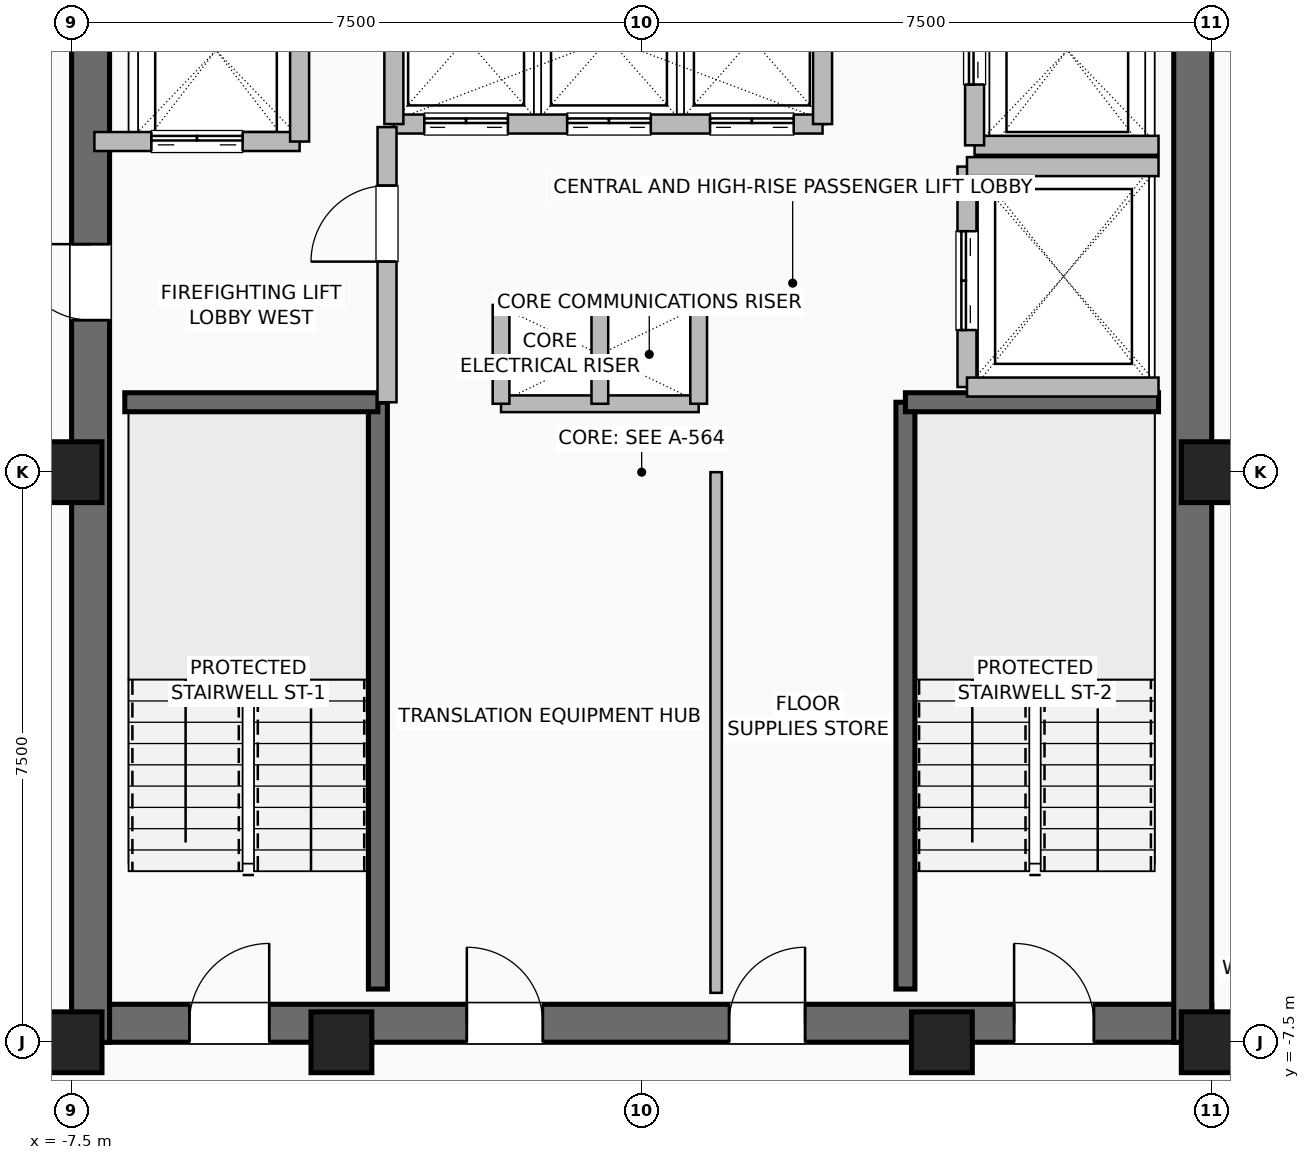
"""IFC4 building model, lengths in metres.
Left out: names, types, materials, properties, quantities, classifications, styles, units other than length and angle.
Written with IfcOpenShell. Run it as: python <this file> out.ifc"""

import sys

from ifc_helpers import new_model, si_unit, direction, frame, frame_2d, origin, origin_2d, place, context, subcontext, project, spatial, rectangle, hollow_rectangle, extrude, element, fill, save


model = new_model("IFC4")
c1 = context("Model", 3, precision=1e-05, world=origin(), true_north=direction((0.0, 1.0)))
c2 = subcontext(c1, "Body", "Model", "MODEL_VIEW")
j1 = project(units=[si_unit("LENGTHUNIT", "METRE"), si_unit("PLANEANGLEUNIT", "RADIAN")], contexts=[c1])
p1 = place(None, origin())
s1 = spatial("IfcSite", under=j1, at=p1, CompositionType="ELEMENT")
p2 = place(p1, origin())
s2 = spatial("IfcBuilding", under=s1, at=p2, CompositionType="ELEMENT")
p3 = place(p2, frame((0.0, 0.0, 257.6)))
s3 = spatial("IfcBuildingStorey", under=s2, at=p3, CompositionType="ELEMENT", Elevation=257.6)
for number, where, z_axis, x_axis in (
    (1, (-7.5, -7.5, 0.0), (0.0, 0.0, 1.0), (1.0, 0.0, 0.0)),
    (2, (-3.95, -7.5, 0.0), (0.0, 0.0, 1.0), (1.0, 0.0, 0.0)),
    (3, (3.95, -7.5, 0.0), (0.0, 0.0, 1.0), (1.0, 0.0, 0.0)),
    (4, (7.5, -7.5, 0.0), (0.0, 0.0, 1.0), (1.0, 0.0, 0.0)),
    (5, (7.5, 0.0, 0.0), (0.0, 0.0, 1.0), (1.0, 0.0, 0.0)),
    (6, (-7.5, 0.0, 0.0), (0.0, 0.0, 1.0), (1.0, 0.0, 0.0)),
):
    element("IfcColumn", number, at=place(p3, frame(where, z_axis=z_axis, x_axis=x_axis)), inside=s3, PredefinedType="COLUMN", context=c2, shape_type="SweptSolid", body=[
        extrude(hollow_rectangle(XDim=0.8, YDim=0.8, WallThickness=0.04, at=origin_2d()), origin(), (0.0, 0.0, 1.0), 3.6),
    ])
p4 = place(p3, frame((-7.5, -7.25, 0.0), z_axis=(0.0, 0.0, 1.0), x_axis=(1.0, 0.0, 0.0)))
e7 = element("IfcWall", 7, at=p4, inside=s3, PredefinedType="SHEAR", context=c2, shape_type="SweptSolid", body=[
    extrude(rectangle(XDim=15.0, YDim=0.5, at=frame_2d((7.5, 0.0))), origin(), (0.0, 0.0, 1.0), 3.36),
])
p5 = place(p4, frame((1.55, 0.0, 0.0)))
e8 = element("IfcOpeningElement", 8, at=p5, cuts=e7, PredefinedType="OPENING", context=c2, shape_type="SweptSolid", body=[
    extrude(rectangle(XDim=1.05, YDim=2.08, at=frame_2d((0.525, 1.04))), frame((0.0, 0.26, 0.0), z_axis=(0.0, -1.0, 0.0), x_axis=(1.0, 0.0, 0.0)), (0.0, 0.0, 1.0), 0.52),
])
p6 = place(p4, frame((12.4, 0.0, 0.0)))
e9 = element("IfcOpeningElement", 9, at=p6, cuts=e7, PredefinedType="OPENING", context=c2, shape_type="SweptSolid", body=[
    extrude(rectangle(XDim=1.05, YDim=2.08, at=frame_2d((0.525, 1.04))), frame((0.0, 0.26, 0.0), z_axis=(0.0, -1.0, 0.0), x_axis=(1.0, 0.0, 0.0)), (0.0, 0.0, 1.0), 0.52),
])
p7 = place(p4, frame((5.2, 0.0, 0.0)))
e10 = element("IfcOpeningElement", 10, at=p7, cuts=e7, PredefinedType="OPENING", context=c2, shape_type="SweptSolid", body=[
    extrude(rectangle(XDim=1.0, YDim=2.08, at=frame_2d((0.5, 1.04))), frame((0.0, 0.26, 0.0), z_axis=(0.0, -1.0, 0.0), x_axis=(1.0, 0.0, 0.0)), (0.0, 0.0, 1.0), 0.52),
])
p8 = place(p4, frame((8.65, 0.0, 0.0)))
e11 = element("IfcOpeningElement", 11, at=p8, cuts=e7, PredefinedType="OPENING", context=c2, shape_type="SweptSolid", body=[
    extrude(rectangle(XDim=1.0, YDim=2.08, at=frame_2d((0.5, 1.04))), frame((0.0, 0.26, 0.0), z_axis=(0.0, -1.0, 0.0), x_axis=(1.0, 0.0, 0.0)), (0.0, 0.0, 1.0), 0.52),
])
p9 = place(p3, frame((-7.25, -7.5, 0.0), z_axis=(0.0, 0.0, 1.0), x_axis=(0.0, 1.0, 0.0)))
e12 = element("IfcWall", 12, at=p9, inside=s3, PredefinedType="SHEAR", context=c2, shape_type="SweptSolid", body=[
    extrude(rectangle(XDim=15.0, YDim=0.5, at=frame_2d((7.5, 0.0))), origin(), (0.0, 0.0, 1.0), 3.36),
])
p10 = place(p9, frame((9.5, 0.0, 0.0)))
e13 = element("IfcOpeningElement", 13, at=p10, cuts=e12, PredefinedType="OPENING", context=c2, shape_type="SweptSolid", body=[
    extrude(rectangle(XDim=1.0, YDim=2.08, at=frame_2d((0.5, 1.04))), frame((0.0, 0.26, 0.0), z_axis=(0.0, -1.0, 0.0), x_axis=(1.0, 0.0, 0.0)), (0.0, 0.0, 1.0), 0.52),
])
p11 = place(p3, frame((7.25, -7.5, 0.0), z_axis=(0.0, 0.0, 1.0), x_axis=(0.0, 1.0, 0.0)))
e14 = element("IfcWall", 14, at=p11, inside=s3, PredefinedType="SHEAR", context=c2, shape_type="SweptSolid", body=[
    extrude(rectangle(XDim=15.0, YDim=0.5, at=frame_2d((7.5, 0.0))), origin(), (0.0, 0.0, 1.0), 3.36),
])
p12 = place(p3, frame((-3.47, -6.8, 0.0), z_axis=(0.0, 0.0, 1.0), x_axis=(0.0, 1.0, 0.0)))
e15 = element("IfcWall", 15, at=p12, inside=s3, PredefinedType="SHEAR", context=c2, shape_type="SweptSolid", body=[
    extrude(rectangle(XDim=7.72, YDim=0.25, at=frame_2d((3.86, 0.0))), origin(), (0.0, 0.0, 1.0), 3.36),
])
p13 = place(p3, frame((-6.8, 0.92, 0.0), z_axis=(0.0, 0.0, 1.0), x_axis=(1.0, 0.0, 0.0)))
e16 = element("IfcWall", 16, at=p13, inside=s3, PredefinedType="SHEAR", context=c2, shape_type="SweptSolid", body=[
    extrude(rectangle(XDim=3.33, YDim=0.25, at=frame_2d((1.665, 0.0))), origin(), (0.0, 0.0, 1.0), 3.36),
])
p14 = place(p3, frame((3.47, -6.8, 0.0), z_axis=(0.0, 0.0, 1.0), x_axis=(0.0, 1.0, 0.0)))
e17 = element("IfcWall", 17, at=p14, inside=s3, PredefinedType="SHEAR", context=c2, shape_type="SweptSolid", body=[
    extrude(rectangle(XDim=7.72, YDim=0.25, at=frame_2d((3.86, 0.0))), origin(), (0.0, 0.0, 1.0), 3.36),
])
p15 = place(p3, frame((3.47, 0.92, 0.0), z_axis=(0.0, 0.0, 1.0), x_axis=(1.0, 0.0, 0.0)))
e18 = element("IfcWall", 18, at=p15, inside=s3, PredefinedType="SHEAR", context=c2, shape_type="SweptSolid", body=[
    extrude(rectangle(XDim=3.33, YDim=0.25, at=frame_2d((1.665, 0.0))), origin(), (0.0, 0.0, 1.0), 3.36),
])
for number, where, z_axis, x_axis in (
    (19, (-1.85, 2.2, 0.0), (0.0, 0.0, 1.0), (1.0, 0.0, 0.0)),
    (20, (-1.85, 0.9, 0.0), (0.0, 0.0, 1.0), (1.0, 0.0, 0.0)),
):
    element("IfcWall", number, at=place(p3, frame(where, z_axis=z_axis, x_axis=x_axis)), inside=s3, PredefinedType="PARTITIONING", context=c2, shape_type="SweptSolid", body=[
        extrude(rectangle(XDim=2.6, YDim=0.22, at=frame_2d((1.3, 0.0))), origin(), (0.0, 0.0, 1.0), 3.36),
    ])
for number, where, z_axis, x_axis in (
    (21, (-0.55, 0.9, 0.0), (0.0, 0.0, 1.0), (0.0, 1.0, 0.0)),
    (22, (0.75, 0.9, 0.0), (0.0, 0.0, 1.0), (0.0, 1.0, 0.0)),
    (23, (-1.85, 0.9, 0.0), (0.0, 0.0, 1.0), (0.0, 1.0, 0.0)),
):
    element("IfcWall", number, at=place(p3, frame(where, z_axis=z_axis, x_axis=x_axis)), inside=s3, PredefinedType="PARTITIONING", context=c2, shape_type="SweptSolid", body=[
        extrude(rectangle(XDim=1.3, YDim=0.22, at=frame_2d((0.65, 0.0))), origin(), (0.0, 0.0, 1.0), 3.36),
    ])
p16 = place(p3, frame((-3.26, 4.58, 0.0), z_axis=(0.0, 0.0, 1.0), x_axis=(1.0, 0.0, 0.0)))
e24 = element("IfcWall", 24, at=p16, inside=s3, PredefinedType="SHEAR", context=c2, shape_type="SweptSolid", body=[
    extrude(rectangle(XDim=5.64, YDim=0.25, at=frame_2d((2.82, 0.0))), origin(), (0.0, 0.0, 1.0), 3.36),
])
p17 = place(p16, frame((0.4, 0.0, 0.0)))
e25 = element("IfcOpeningElement", 25, at=p17, cuts=e24, PredefinedType="OPENING", context=c2, shape_type="SweptSolid", body=[
    extrude(rectangle(XDim=1.1, YDim=2.2, at=frame_2d((0.55, 1.1))), frame((0.0, 0.135, 0.0), z_axis=(0.0, -1.0, 0.0), x_axis=(1.0, 0.0, 0.0)), (0.0, 0.0, 1.0), 0.27),
])
p18 = place(p16, frame((2.28, 0.0, 0.0)))
e26 = element("IfcOpeningElement", 26, at=p18, cuts=e24, PredefinedType="OPENING", context=c2, shape_type="SweptSolid", body=[
    extrude(rectangle(XDim=1.1, YDim=2.2, at=frame_2d((0.55, 1.1))), frame((0.0, 0.135, 0.0), z_axis=(0.0, -1.0, 0.0), x_axis=(1.0, 0.0, 0.0)), (0.0, 0.0, 1.0), 0.27),
])
p19 = place(p16, frame((4.16, 0.0, 0.0)))
e27 = element("IfcOpeningElement", 27, at=p19, cuts=e24, PredefinedType="OPENING", context=c2, shape_type="SweptSolid", body=[
    extrude(rectangle(XDim=1.1, YDim=2.2, at=frame_2d((0.55, 1.1))), frame((0.0, 0.135, 0.0), z_axis=(0.0, -1.0, 0.0), x_axis=(1.0, 0.0, 0.0)), (0.0, 0.0, 1.0), 0.27),
])
for number, where, z_axis, x_axis in (
    (28, (-3.26, 4.58, 0.0), (0.0, 0.0, 1.0), (0.0, 1.0, 0.0)),
    (29, (2.38, 4.58, 0.0), (0.0, 0.0, 1.0), (0.0, 1.0, 0.0)),
):
    element("IfcWall", number, at=place(p3, frame(where, z_axis=z_axis, x_axis=x_axis)), inside=s3, PredefinedType="SHEAR", context=c2, shape_type="SweptSolid", body=[
        extrude(rectangle(XDim=2.22, YDim=0.25, at=frame_2d((1.11, 0.0))), origin(), (0.0, 0.0, 1.0), 3.36),
    ])
p20 = place(p3, frame((-7.2, 4.35, 0.0), z_axis=(0.0, 0.0, 1.0), x_axis=(1.0, 0.0, 0.0)))
e30 = element("IfcWall", 30, at=p20, inside=s3, PredefinedType="SHEAR", context=c2, shape_type="SweptSolid", body=[
    extrude(rectangle(XDim=2.7, YDim=0.25, at=frame_2d((1.35, 0.0))), origin(), (0.0, 0.0, 1.0), 3.36),
])
p21 = place(p20, frame((0.75, 0.0, 0.0)))
e31 = element("IfcOpeningElement", 31, at=p21, cuts=e30, PredefinedType="OPENING", context=c2, shape_type="SweptSolid", body=[
    extrude(rectangle(XDim=1.2, YDim=2.2, at=frame_2d((0.6, 1.1))), frame((0.0, 0.135, 0.0), z_axis=(0.0, -1.0, 0.0), x_axis=(1.0, 0.0, 0.0)), (0.0, 0.0, 1.0), 0.27),
])
p22 = place(p3, frame((-4.5, 4.35, 0.0), z_axis=(0.0, 0.0, 1.0), x_axis=(0.0, 1.0, 0.0)))
e32 = element("IfcWall", 32, at=p22, inside=s3, PredefinedType="SHEAR", context=c2, shape_type="SweptSolid", body=[
    extrude(rectangle(XDim=2.85, YDim=0.25, at=frame_2d((1.425, 0.0))), origin(), (0.0, 0.0, 1.0), 3.36),
])
p23 = place(p3, frame((4.38, 4.3, 0.0), z_axis=(0.0, 0.0, 1.0), x_axis=(1.0, 0.0, 0.0)))
e33 = element("IfcWall", 33, at=p23, inside=s3, PredefinedType="SHEAR", context=c2, shape_type="SweptSolid", body=[
    extrude(rectangle(XDim=2.42, YDim=0.25, at=frame_2d((1.21, 0.0))), origin(), (0.0, 0.0, 1.0), 3.36),
])
p24 = place(p3, frame((4.38, 4.3, 0.0), z_axis=(0.0, 0.0, 1.0), x_axis=(0.0, 1.0, 0.0)))
e34 = element("IfcWall", 34, at=p24, inside=s3, PredefinedType="SHEAR", context=c2, shape_type="SweptSolid", body=[
    extrude(rectangle(XDim=2.5, YDim=0.25, at=frame_2d((1.25, 0.0))), origin(), (0.0, 0.0, 1.0), 3.36),
])
p25 = place(p24, frame((0.8, 0.0, 0.0)))
e35 = element("IfcOpeningElement", 35, at=p25, cuts=e34, PredefinedType="OPENING", context=c2, shape_type="SweptSolid", body=[
    extrude(rectangle(XDim=1.2, YDim=2.2, at=frame_2d((0.6, 1.1))), frame((0.0, 0.135, 0.0), z_axis=(0.0, -1.0, 0.0), x_axis=(1.0, 0.0, 0.0)), (0.0, 0.0, 1.0), 0.27),
])
p26 = place(p3, frame((4.28, 1.12, 0.0), z_axis=(0.0, 0.0, 1.0), x_axis=(0.0, 1.0, 0.0)))
e36 = element("IfcWall", 36, at=p26, inside=s3, PredefinedType="SHEAR", context=c2, shape_type="SweptSolid", body=[
    extrude(rectangle(XDim=2.9, YDim=0.25, at=frame_2d((1.45, 0.0))), origin(), (0.0, 0.0, 1.0), 3.36),
])
p27 = place(p26, frame((0.75, 0.0, 0.0)))
e37 = element("IfcOpeningElement", 37, at=p27, cuts=e36, PredefinedType="OPENING", context=c2, shape_type="SweptSolid", body=[
    extrude(rectangle(XDim=1.3, YDim=2.3, at=frame_2d((0.65, 1.15))), frame((0.0, 0.135, 0.0), z_axis=(0.0, -1.0, 0.0), x_axis=(1.0, 0.0, 0.0)), (0.0, 0.0, 1.0), 0.27),
])
for number, where, z_axis, x_axis in (
    (38, (4.28, 1.12, 0.0), (0.0, 0.0, 1.0), (1.0, 0.0, 0.0)),
    (39, (4.28, 4.02, 0.0), (0.0, 0.0, 1.0), (1.0, 0.0, 0.0)),
):
    element("IfcWall", number, at=place(p3, frame(where, z_axis=z_axis, x_axis=x_axis)), inside=s3, PredefinedType="SHEAR", context=c2, shape_type="SweptSolid", body=[
        extrude(rectangle(XDim=2.52, YDim=0.25, at=frame_2d((1.26, 0.0))), origin(), (0.0, 0.0, 1.0), 3.36),
    ])
p28 = place(p3, frame((-3.35, 0.92, 0.0), z_axis=(0.0, 0.0, 1.0), x_axis=(0.0, 1.0, 0.0)))
e40 = element("IfcWall", 40, at=p28, inside=s3, PredefinedType="SHEAR", context=c2, shape_type="SweptSolid", body=[
    extrude(rectangle(XDim=3.62, YDim=0.25, at=frame_2d((1.81, 0.0))), origin(), (0.0, 0.0, 1.0), 3.36),
])
p29 = place(p28, frame((1.85, 0.0, 0.0)))
e41 = element("IfcOpeningElement", 41, at=p29, cuts=e40, PredefinedType="OPENING", context=c2, shape_type="SweptSolid", body=[
    extrude(rectangle(XDim=1.0, YDim=2.08, at=frame_2d((0.5, 1.04))), frame((0.0, 0.135, 0.0), z_axis=(0.0, -1.0, 0.0), x_axis=(1.0, 0.0, 0.0)), (0.0, 0.0, 1.0), 0.27),
])
p30 = place(p3, frame((0.98, -6.85, 0.0), z_axis=(0.0, 0.0, 1.0), x_axis=(0.0, 1.0, 0.0)))
e42 = element("IfcWall", 42, at=p30, inside=s3, PredefinedType="PARTITIONING", context=c2, shape_type="SweptSolid", body=[
    extrude(rectangle(XDim=6.85, YDim=0.15, at=frame_2d((3.425, 0.0))), origin(), (0.0, 0.0, 1.0), 3.36),
])
p31 = place(p3, frame((7.45, -7.48, 0.0), z_axis=(0.0, 0.0, 1.0), x_axis=(1.0, 0.0, 0.0)))
e43 = element("IfcWall", 43, at=p31, inside=s3, PredefinedType="PARTITIONING", context=c2, shape_type="SweptSolid", body=[
    extrude(rectangle(XDim=0.95, YDim=0.15, at=frame_2d((0.475, 0.0))), origin(), (0.0, 0.0, 1.0), 3.36),
])
p32 = place(p5, origin())
e44 = element("IfcDoor", 44, at=p32, inside=s3, OperationType="SINGLE_SWING_RIGHT", PredefinedType="DOOR", context=c2, shape_type="SweptSolid", body=[
    extrude(rectangle(XDim=1.05, YDim=2.08, at=frame_2d((0.525, 1.04))), frame((0.0, 0.025, 0.0), z_axis=(0.0, -1.0, 0.0), x_axis=(1.0, 0.0, 0.0)), (0.0, 0.0, 1.0), 0.05),
])
fill(e8, e44)
p33 = place(p6, origin())
e45 = element("IfcDoor", 45, at=p33, inside=s3, OperationType="SINGLE_SWING_LEFT", PredefinedType="DOOR", context=c2, shape_type="SweptSolid", body=[
    extrude(rectangle(XDim=1.05, YDim=2.08, at=frame_2d((0.525, 1.04))), frame((0.0, 0.025, 0.0), z_axis=(0.0, -1.0, 0.0), x_axis=(1.0, 0.0, 0.0)), (0.0, 0.0, 1.0), 0.05),
])
fill(e9, e45)
p34 = place(p10, origin())
e46 = element("IfcDoor", 46, at=p34, inside=s3, OperationType="SINGLE_SWING_RIGHT", PredefinedType="DOOR", context=c2, shape_type="SweptSolid", body=[
    extrude(rectangle(XDim=1.0, YDim=2.08, at=frame_2d((0.5, 1.04))), frame((0.0, 0.025, 0.0), z_axis=(0.0, -1.0, 0.0), x_axis=(1.0, 0.0, 0.0)), (0.0, 0.0, 1.0), 0.05),
])
fill(e13, e46)
p35 = place(p7, origin())
e47 = element("IfcDoor", 47, at=p35, inside=s3, OperationType="SINGLE_SWING_LEFT", PredefinedType="DOOR", context=c2, shape_type="SweptSolid", body=[
    extrude(rectangle(XDim=1.0, YDim=2.08, at=frame_2d((0.5, 1.04))), frame((0.0, 0.025, 0.0), z_axis=(0.0, -1.0, 0.0), x_axis=(1.0, 0.0, 0.0)), (0.0, 0.0, 1.0), 0.05),
])
fill(e10, e47)
p36 = place(p8, origin())
e48 = element("IfcDoor", 48, at=p36, inside=s3, OperationType="SINGLE_SWING_RIGHT", PredefinedType="DOOR", context=c2, shape_type="SweptSolid", body=[
    extrude(rectangle(XDim=1.0, YDim=2.08, at=frame_2d((0.5, 1.04))), frame((0.0, 0.025, 0.0), z_axis=(0.0, -1.0, 0.0), x_axis=(1.0, 0.0, 0.0)), (0.0, 0.0, 1.0), 0.05),
])
fill(e11, e48)
p37 = place(p17, origin())
e49 = element("IfcDoor", 49, at=p37, inside=s3, OperationType="DOUBLE_DOOR_SLIDING", PredefinedType="DOOR", context=c2, shape_type="SweptSolid", body=[
    extrude(rectangle(XDim=1.1, YDim=2.2, at=frame_2d((0.55, 1.1))), frame((0.0, 0.025, 0.0), z_axis=(0.0, -1.0, 0.0), x_axis=(1.0, 0.0, 0.0)), (0.0, 0.0, 1.0), 0.05),
])
fill(e25, e49)
p38 = place(p18, origin())
e50 = element("IfcDoor", 50, at=p38, inside=s3, OperationType="DOUBLE_DOOR_SLIDING", PredefinedType="DOOR", context=c2, shape_type="SweptSolid", body=[
    extrude(rectangle(XDim=1.1, YDim=2.2, at=frame_2d((0.55, 1.1))), frame((0.0, 0.025, 0.0), z_axis=(0.0, -1.0, 0.0), x_axis=(1.0, 0.0, 0.0)), (0.0, 0.0, 1.0), 0.05),
])
fill(e26, e50)
p39 = place(p19, origin())
e51 = element("IfcDoor", 51, at=p39, inside=s3, OperationType="DOUBLE_DOOR_SLIDING", PredefinedType="DOOR", context=c2, shape_type="SweptSolid", body=[
    extrude(rectangle(XDim=1.1, YDim=2.2, at=frame_2d((0.55, 1.1))), frame((0.0, 0.025, 0.0), z_axis=(0.0, -1.0, 0.0), x_axis=(1.0, 0.0, 0.0)), (0.0, 0.0, 1.0), 0.05),
])
fill(e27, e51)
p40 = place(p21, origin())
e52 = element("IfcDoor", 52, at=p40, inside=s3, OperationType="DOUBLE_DOOR_SLIDING", PredefinedType="DOOR", context=c2, shape_type="SweptSolid", body=[
    extrude(rectangle(XDim=1.2, YDim=2.2, at=frame_2d((0.6, 1.1))), frame((0.0, 0.025, 0.0), z_axis=(0.0, -1.0, 0.0), x_axis=(1.0, 0.0, 0.0)), (0.0, 0.0, 1.0), 0.05),
])
fill(e31, e52)
p41 = place(p25, origin())
e53 = element("IfcDoor", 53, at=p41, inside=s3, OperationType="DOUBLE_DOOR_SLIDING", PredefinedType="DOOR", context=c2, shape_type="SweptSolid", body=[
    extrude(rectangle(XDim=1.2, YDim=2.2, at=frame_2d((0.6, 1.1))), frame((0.0, 0.025, 0.0), z_axis=(0.0, -1.0, 0.0), x_axis=(1.0, 0.0, 0.0)), (0.0, 0.0, 1.0), 0.05),
])
fill(e35, e53)
p42 = place(p27, origin())
e54 = element("IfcDoor", 54, at=p42, inside=s3, OperationType="DOUBLE_DOOR_SLIDING", PredefinedType="DOOR", context=c2, shape_type="SweptSolid", body=[
    extrude(rectangle(XDim=1.3, YDim=2.3, at=frame_2d((0.65, 1.15))), frame((0.0, 0.025, 0.0), z_axis=(0.0, -1.0, 0.0), x_axis=(1.0, 0.0, 0.0)), (0.0, 0.0, 1.0), 0.05),
])
fill(e37, e54)
p43 = place(p29, origin())
e55 = element("IfcDoor", 55, at=p43, inside=s3, OperationType="SINGLE_SWING_LEFT", PredefinedType="DOOR", context=c2, shape_type="SweptSolid", body=[
    extrude(rectangle(XDim=1.0, YDim=2.08, at=frame_2d((0.5, 1.04))), frame((0.0, 0.025, 0.0), z_axis=(0.0, -1.0, 0.0), x_axis=(1.0, 0.0, 0.0)), (0.0, 0.0, 1.0), 0.05),
])
fill(e41, e55)
save(model, sys.argv[1])
